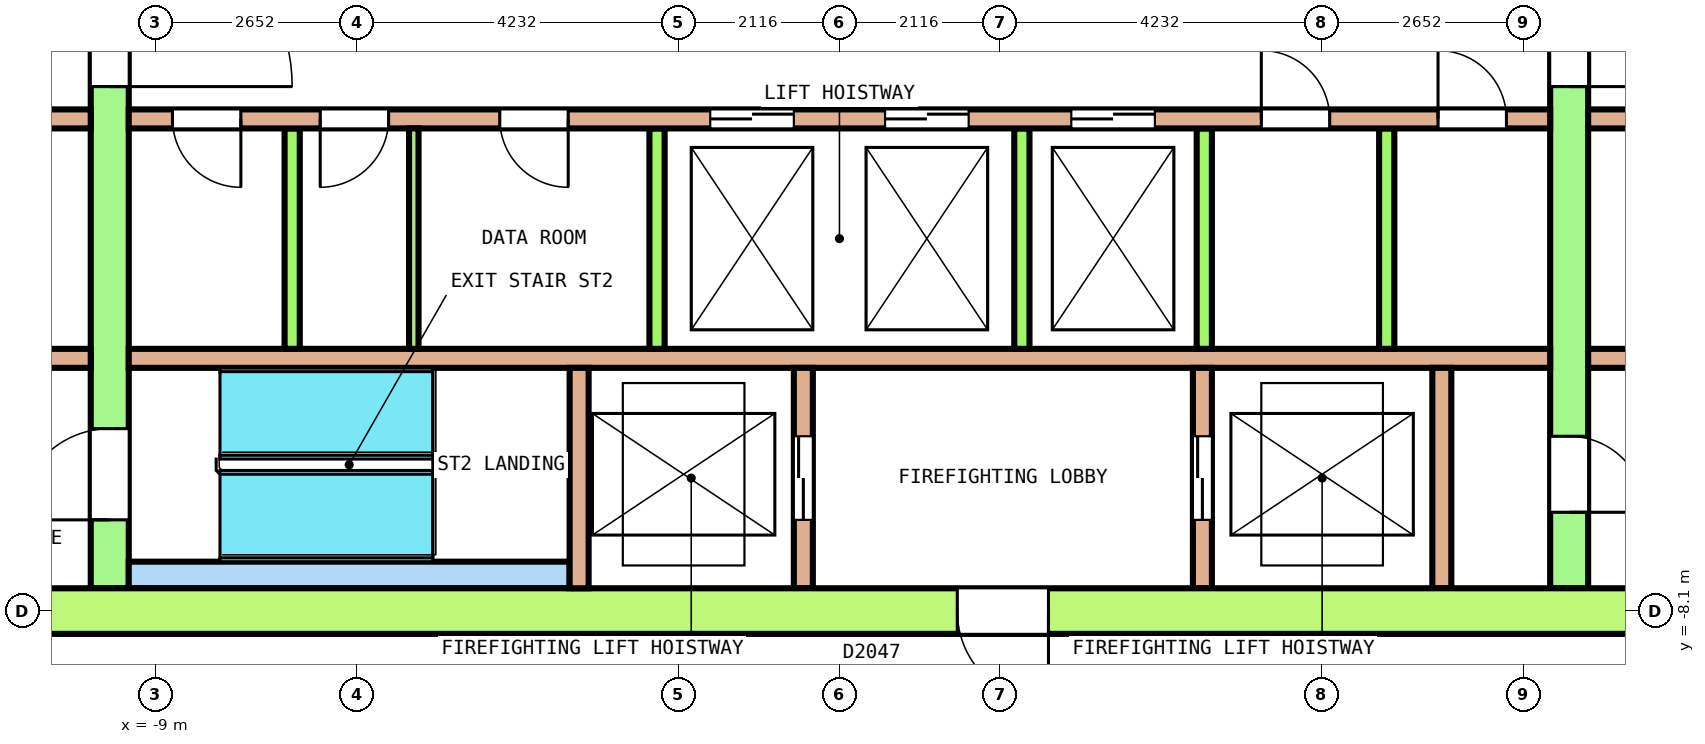
"""IFC4 building model, lengths in metres.
Left out: names, types, materials, properties, quantities, classifications, styles, units other than length and angle.
Written with IfcOpenShell. Run it as: python <this file> out.ifc"""

import sys

from ifc_helpers import new_model, si_unit, direction, frame, frame_2d, origin, place, context, subcontext, project, spatial, rectangle, extrude, element, fill, save


model = new_model("IFC4")
c1 = context("Model", 3, precision=1e-05, world=origin(), true_north=direction((0.0, 1.0)))
c2 = subcontext(c1, "Body", "Model", "MODEL_VIEW")
j1 = project(units=[si_unit("LENGTHUNIT", "METRE"), si_unit("PLANEANGLEUNIT", "RADIAN")], contexts=[c1])
p1 = place(None, origin())
s1 = spatial("IfcSite", under=j1, at=p1, CompositionType="ELEMENT")
p2 = place(p1, origin())
s2 = spatial("IfcBuilding", under=s1, at=p2, CompositionType="ELEMENT")
p3 = place(p2, frame((0.0, 0.0, 245.4)))
s3 = spatial("IfcBuildingStorey", under=s2, at=p3, CompositionType="ELEMENT", Elevation=245.4)
p4 = place(p3, frame((-13.5, -8.1, 0.0), z_axis=(0.0, 0.0, 1.0), x_axis=(1.0, 0.0, 0.0)))
e1 = element("IfcWall", 1, at=p4, inside=s3, PredefinedType="SHEAR", context=c2, shape_type="SweptSolid", body=[
    extrude(rectangle(XDim=27.0, YDim=0.6, at=frame_2d((13.5, 0.0))), origin(), (0.0, 0.0, 1.0), 3.7),
])
p5 = place(p4, frame((15.05, 0.0, 0.0)))
e2 = element("IfcOpeningElement", 2, at=p5, cuts=e1, PredefinedType="OPENING", context=c2, shape_type="SweptSolid", body=[
    extrude(rectangle(XDim=1.2, YDim=2.1, at=frame_2d((0.6, 1.05))), frame((0.0, 0.31, 0.0), z_axis=(0.0, -1.0, 0.0), x_axis=(1.0, 0.0, 0.0)), (0.0, 0.0, 1.0), 0.62),
])
p6 = place(p3, frame((-9.6, -7.8, 0.0), z_axis=(0.0, 0.0, 1.0), x_axis=(0.0, 1.0, 0.0)))
e3 = element("IfcWall", 3, at=p6, inside=s3, PredefinedType="SHEAR", context=c2, shape_type="SweptSolid", body=[
    extrude(rectangle(XDim=15.6, YDim=0.5, at=frame_2d((7.8, 0.0))), origin(), (0.0, 0.0, 1.0), 3.7),
])
p7 = place(p6, frame((6.6, 0.0, 0.0)))
e4 = element("IfcOpeningElement", 4, at=p7, cuts=e3, PredefinedType="OPENING", context=c2, shape_type="SweptSolid", body=[
    extrude(rectangle(XDim=2.4, YDim=2.1, at=frame_2d((1.2, 1.05))), frame((0.0, 0.26, 0.0), z_axis=(0.0, -1.0, 0.0), x_axis=(1.0, 0.0, 0.0)), (0.0, 0.0, 1.0), 0.52),
])
p8 = place(p6, frame((13.5, 0.0, 0.0)))
e5 = element("IfcOpeningElement", 5, at=p8, cuts=e3, PredefinedType="OPENING", context=c2, shape_type="SweptSolid", body=[
    extrude(rectangle(XDim=1.2, YDim=2.1, at=frame_2d((0.6, 1.05))), frame((0.0, 0.26, 0.0), z_axis=(0.0, -1.0, 0.0), x_axis=(1.0, 0.0, 0.0)), (0.0, 0.0, 1.0), 0.52),
])
p9 = place(p6, frame((0.9, 0.0, 0.0)))
e6 = element("IfcOpeningElement", 6, at=p9, cuts=e3, PredefinedType="OPENING", context=c2, shape_type="SweptSolid", body=[
    extrude(rectangle(XDim=1.2, YDim=2.1, at=frame_2d((0.6, 1.05))), frame((0.0, 0.26, 0.0), z_axis=(0.0, -1.0, 0.0), x_axis=(1.0, 0.0, 0.0)), (0.0, 0.0, 1.0), 0.52),
])
p10 = place(p3, frame((9.6, -7.8, 0.0), z_axis=(0.0, 0.0, 1.0), x_axis=(0.0, 1.0, 0.0)))
e7 = element("IfcWall", 7, at=p10, inside=s3, PredefinedType="SHEAR", context=c2, shape_type="SweptSolid", body=[
    extrude(rectangle(XDim=15.6, YDim=0.5, at=frame_2d((7.8, 0.0))), origin(), (0.0, 0.0, 1.0), 3.7),
])
p11 = place(p10, frame((6.6, 0.0, 0.0)))
e8 = element("IfcOpeningElement", 8, at=p11, cuts=e7, PredefinedType="OPENING", context=c2, shape_type="SweptSolid", body=[
    extrude(rectangle(XDim=2.4, YDim=2.1, at=frame_2d((1.2, 1.05))), frame((0.0, 0.26, 0.0), z_axis=(0.0, -1.0, 0.0), x_axis=(1.0, 0.0, 0.0)), (0.0, 0.0, 1.0), 0.52),
])
p12 = place(p10, frame((13.5, 0.0, 0.0)))
e9 = element("IfcOpeningElement", 9, at=p12, cuts=e7, PredefinedType="OPENING", context=c2, shape_type="SweptSolid", body=[
    extrude(rectangle(XDim=1.2, YDim=2.1, at=frame_2d((0.6, 1.05))), frame((0.0, 0.26, 0.0), z_axis=(0.0, -1.0, 0.0), x_axis=(1.0, 0.0, 0.0)), (0.0, 0.0, 1.0), 0.52),
])
p13 = place(p10, frame((1.0, 0.0, 0.0)))
e10 = element("IfcOpeningElement", 10, at=p13, cuts=e7, PredefinedType="OPENING", context=c2, shape_type="SweptSolid", body=[
    extrude(rectangle(XDim=1.0, YDim=2.1, at=frame_2d((0.5, 1.05))), frame((0.0, 0.26, 0.0), z_axis=(0.0, -1.0, 0.0), x_axis=(1.0, 0.0, 0.0)), (0.0, 0.0, 1.0), 0.52),
])
p14 = place(p3, frame((-12.9, -1.625, 0.0), z_axis=(0.0, 0.0, 1.0), x_axis=(1.0, 0.0, 0.0)))
e11 = element("IfcWall", 11, at=p14, inside=s3, PredefinedType="SOLIDWALL", context=c2, shape_type="SweptSolid", body=[
    extrude(rectangle(XDim=3.05, YDim=0.25, at=frame_2d((1.525, 0.0))), origin(), (0.0, 0.0, 1.0), 3.7),
])
p15 = place(p14, frame((1.075, 0.0, 0.0)))
e12 = element("IfcOpeningElement", 12, at=p15, cuts=e11, PredefinedType="OPENING", context=c2, shape_type="SweptSolid", body=[
    extrude(rectangle(XDim=0.9, YDim=2.1, at=frame_2d((0.45, 1.05))), frame((0.0, 0.135, 0.0), z_axis=(0.0, -1.0, 0.0), x_axis=(1.0, 0.0, 0.0)), (0.0, 0.0, 1.0), 0.27),
])
p16 = place(p3, frame((-9.35, -1.625, 0.0), z_axis=(0.0, 0.0, 1.0), x_axis=(1.0, 0.0, 0.0)))
e13 = element("IfcWall", 13, at=p16, inside=s3, PredefinedType="SOLIDWALL", context=c2, shape_type="SweptSolid", body=[
    extrude(rectangle(XDim=18.7, YDim=0.25, at=frame_2d((9.35, 0.0))), origin(), (0.0, 0.0, 1.0), 3.7),
])
p17 = place(p16, frame((7.65, 0.0, 0.0)))
e14 = element("IfcOpeningElement", 14, at=p17, cuts=e13, PredefinedType="OPENING", context=c2, shape_type="SweptSolid", body=[
    extrude(rectangle(XDim=1.1, YDim=2.1, at=frame_2d((0.55, 1.05))), frame((0.0, 0.135, 0.0), z_axis=(0.0, -1.0, 0.0), x_axis=(1.0, 0.0, 0.0)), (0.0, 0.0, 1.0), 0.27),
])
p18 = place(p16, frame((9.95, 0.0, 0.0)))
e15 = element("IfcOpeningElement", 15, at=p18, cuts=e13, PredefinedType="OPENING", context=c2, shape_type="SweptSolid", body=[
    extrude(rectangle(XDim=1.1, YDim=2.1, at=frame_2d((0.55, 1.05))), frame((0.0, 0.135, 0.0), z_axis=(0.0, -1.0, 0.0), x_axis=(1.0, 0.0, 0.0)), (0.0, 0.0, 1.0), 0.27),
])
p19 = place(p16, frame((12.4, 0.0, 0.0)))
e16 = element("IfcOpeningElement", 16, at=p19, cuts=e13, PredefinedType="OPENING", context=c2, shape_type="SweptSolid", body=[
    extrude(rectangle(XDim=1.1, YDim=2.1, at=frame_2d((0.55, 1.05))), frame((0.0, 0.135, 0.0), z_axis=(0.0, -1.0, 0.0), x_axis=(1.0, 0.0, 0.0)), (0.0, 0.0, 1.0), 0.27),
])
p20 = place(p16, frame((0.575, 0.0, 0.0)))
e17 = element("IfcOpeningElement", 17, at=p20, cuts=e13, PredefinedType="OPENING", context=c2, shape_type="SweptSolid", body=[
    extrude(rectangle(XDim=0.9, YDim=2.1, at=frame_2d((0.45, 1.05))), frame((0.0, 0.135, 0.0), z_axis=(0.0, -1.0, 0.0), x_axis=(1.0, 0.0, 0.0)), (0.0, 0.0, 1.0), 0.27),
])
p21 = place(p16, frame((2.519, 0.0, 0.0)))
e18 = element("IfcOpeningElement", 18, at=p21, cuts=e13, PredefinedType="OPENING", context=c2, shape_type="SweptSolid", body=[
    extrude(rectangle(XDim=0.9, YDim=2.1, at=frame_2d((0.45, 1.05))), frame((0.0, 0.135, 0.0), z_axis=(0.0, -1.0, 0.0), x_axis=(1.0, 0.0, 0.0)), (0.0, 0.0, 1.0), 0.27),
])
p22 = place(p16, frame((4.881, 0.0, 0.0)))
e19 = element("IfcOpeningElement", 19, at=p22, cuts=e13, PredefinedType="OPENING", context=c2, shape_type="SweptSolid", body=[
    extrude(rectangle(XDim=0.9, YDim=2.1, at=frame_2d((0.45, 1.05))), frame((0.0, 0.135, 0.0), z_axis=(0.0, -1.0, 0.0), x_axis=(1.0, 0.0, 0.0)), (0.0, 0.0, 1.0), 0.27),
])
p23 = place(p16, frame((14.9, 0.0, 0.0)))
e20 = element("IfcOpeningElement", 20, at=p23, cuts=e13, PredefinedType="OPENING", context=c2, shape_type="SweptSolid", body=[
    extrude(rectangle(XDim=0.9, YDim=2.1, at=frame_2d((0.45, 1.05))), frame((0.0, 0.135, 0.0), z_axis=(0.0, -1.0, 0.0), x_axis=(1.0, 0.0, 0.0)), (0.0, 0.0, 1.0), 0.27),
])
p24 = place(p16, frame((17.225, 0.0, 0.0)))
e21 = element("IfcOpeningElement", 21, at=p24, cuts=e13, PredefinedType="OPENING", context=c2, shape_type="SweptSolid", body=[
    extrude(rectangle(XDim=0.9, YDim=2.1, at=frame_2d((0.45, 1.05))), frame((0.0, 0.135, 0.0), z_axis=(0.0, -1.0, 0.0), x_axis=(1.0, 0.0, 0.0)), (0.0, 0.0, 1.0), 0.27),
])
p25 = place(p3, frame((9.85, -1.625, 0.0), z_axis=(0.0, 0.0, 1.0), x_axis=(1.0, 0.0, 0.0)))
e22 = element("IfcWall", 22, at=p25, inside=s3, PredefinedType="SOLIDWALL", context=c2, shape_type="SweptSolid", body=[
    extrude(rectangle(XDim=3.05, YDim=0.25, at=frame_2d((1.525, 0.0))), origin(), (0.0, 0.0, 1.0), 3.7),
])
p26 = place(p25, frame((1.075, 0.0, 0.0)))
e23 = element("IfcOpeningElement", 23, at=p26, cuts=e22, PredefinedType="OPENING", context=c2, shape_type="SweptSolid", body=[
    extrude(rectangle(XDim=0.9, YDim=2.1, at=frame_2d((0.45, 1.05))), frame((0.0, 0.135, 0.0), z_axis=(0.0, -1.0, 0.0), x_axis=(1.0, 0.0, 0.0)), (0.0, 0.0, 1.0), 0.27),
])
p27 = place(p3, frame((-12.9, -4.775, 0.0), z_axis=(0.0, 0.0, 1.0), x_axis=(1.0, 0.0, 0.0)))
e24 = element("IfcWall", 24, at=p27, inside=s3, PredefinedType="SOLIDWALL", context=c2, shape_type="SweptSolid", body=[
    extrude(rectangle(XDim=3.05, YDim=0.25, at=frame_2d((1.525, 0.0))), origin(), (0.0, 0.0, 1.0), 3.7),
])
p28 = place(p3, frame((-9.35, -4.775, 0.0), z_axis=(0.0, 0.0, 1.0), x_axis=(1.0, 0.0, 0.0)))
e25 = element("IfcWall", 25, at=p28, inside=s3, PredefinedType="SOLIDWALL", context=c2, shape_type="SweptSolid", body=[
    extrude(rectangle(XDim=18.7, YDim=0.25, at=frame_2d((9.35, 0.0))), origin(), (0.0, 0.0, 1.0), 3.7),
])
p29 = place(p3, frame((9.85, -4.775, 0.0), z_axis=(0.0, 0.0, 1.0), x_axis=(1.0, 0.0, 0.0)))
e26 = element("IfcWall", 26, at=p29, inside=s3, PredefinedType="SOLIDWALL", context=c2, shape_type="SweptSolid", body=[
    extrude(rectangle(XDim=3.05, YDim=0.25, at=frame_2d((1.525, 0.0))), origin(), (0.0, 0.0, 1.0), 3.7),
])
for number, where, z_axis, x_axis in (
    (27, (-7.2, -4.65, 0.0), (0.0, 0.0, 1.0), (0.0, 1.0, 0.0)),
    (28, (-2.4, -4.65, 0.0), (0.0, 0.0, 1.0), (0.0, 1.0, 0.0)),
    (29, (2.4, -4.65, 0.0), (0.0, 0.0, 1.0), (0.0, 1.0, 0.0)),
    (30, (4.8, -4.65, 0.0), (0.0, 0.0, 1.0), (0.0, 1.0, 0.0)),
    (31, (7.2, -4.65, 0.0), (0.0, 0.0, 1.0), (0.0, 1.0, 0.0)),
):
    element("IfcWall", number, at=place(p3, frame(where, z_axis=z_axis, x_axis=x_axis)), inside=s3, PredefinedType="SOLIDWALL", context=c2, shape_type="SweptSolid", body=[
        extrude(rectangle(XDim=2.9, YDim=0.2, at=frame_2d((1.45, 0.0))), origin(), (0.0, 0.0, 1.0), 3.7),
    ])
p30 = place(p3, frame((-9.35, -7.625, 0.0), z_axis=(0.0, 0.0, 1.0), x_axis=(1.0, 0.0, 0.0)))
e32 = element("IfcWall", 32, at=p30, inside=s3, PredefinedType="SOLIDWALL", context=c2, shape_type="SweptSolid", body=[
    extrude(rectangle(XDim=5.8, YDim=0.35, at=frame_2d((2.9, 0.0))), origin(), (0.0, 0.0, 1.0), 3.7),
])
p31 = place(p3, frame((-3.425, -7.8, 0.0), z_axis=(0.0, 0.0, 1.0), x_axis=(0.0, 1.0, 0.0)))
e33 = element("IfcWall", 33, at=p31, inside=s3, PredefinedType="SOLIDWALL", context=c2, shape_type="SweptSolid", body=[
    extrude(rectangle(XDim=2.9, YDim=0.25, at=frame_2d((1.45, 0.0))), origin(), (0.0, 0.0, 1.0), 3.7),
])
p32 = place(p3, frame((-0.475, -7.8, 0.0), z_axis=(0.0, 0.0, 1.0), x_axis=(0.0, 1.0, 0.0)))
e34 = element("IfcWall", 34, at=p32, inside=s3, PredefinedType="SOLIDWALL", context=c2, shape_type="SweptSolid", body=[
    extrude(rectangle(XDim=2.9, YDim=0.25, at=frame_2d((1.45, 0.0))), origin(), (0.0, 0.0, 1.0), 3.7),
])
p33 = place(p32, frame((0.9, 0.0, 0.0)))
e35 = element("IfcOpeningElement", 35, at=p33, cuts=e34, PredefinedType="OPENING", context=c2, shape_type="SweptSolid", body=[
    extrude(rectangle(XDim=1.1, YDim=2.1, at=frame_2d((0.55, 1.05))), frame((0.0, 0.135, 0.0), z_axis=(0.0, -1.0, 0.0), x_axis=(1.0, 0.0, 0.0)), (0.0, 0.0, 1.0), 0.27),
])
p34 = place(p3, frame((4.775, -7.8, 0.0), z_axis=(0.0, 0.0, 1.0), x_axis=(0.0, 1.0, 0.0)))
e36 = element("IfcWall", 36, at=p34, inside=s3, PredefinedType="SOLIDWALL", context=c2, shape_type="SweptSolid", body=[
    extrude(rectangle(XDim=2.9, YDim=0.25, at=frame_2d((1.45, 0.0))), origin(), (0.0, 0.0, 1.0), 3.7),
])
p35 = place(p34, frame((0.9, 0.0, 0.0)))
e37 = element("IfcOpeningElement", 37, at=p35, cuts=e36, PredefinedType="OPENING", context=c2, shape_type="SweptSolid", body=[
    extrude(rectangle(XDim=1.1, YDim=2.1, at=frame_2d((0.55, 1.05))), frame((0.0, 0.135, 0.0), z_axis=(0.0, -1.0, 0.0), x_axis=(1.0, 0.0, 0.0)), (0.0, 0.0, 1.0), 0.27),
])
p36 = place(p3, frame((7.925, -7.8, 0.0), z_axis=(0.0, 0.0, 1.0), x_axis=(0.0, 1.0, 0.0)))
e38 = element("IfcWall", 38, at=p36, inside=s3, PredefinedType="SOLIDWALL", context=c2, shape_type="SweptSolid", body=[
    extrude(rectangle(XDim=2.9, YDim=0.25, at=frame_2d((1.45, 0.0))), origin(), (0.0, 0.0, 1.0), 3.7),
])
p37 = place(p3, frame((-5.6, -4.65, 0.0), z_axis=(0.0, 0.0, 1.0), x_axis=(0.0, 1.0, 0.0)))
e39 = element("IfcWall", 39, at=p37, inside=s3, PredefinedType="PARTITIONING", context=c2, shape_type="SweptSolid", body=[
    extrude(rectangle(XDim=2.9, YDim=0.125, at=frame_2d((1.45, 0.0))), origin(), (0.0, 0.0, 1.0), 3.7),
])
p38 = place(p17, origin())
e40 = element("IfcDoor", 40, at=p38, inside=s3, OperationType="DOUBLE_DOOR_SLIDING", PredefinedType="DOOR", context=c2, shape_type="SweptSolid", body=[
    extrude(rectangle(XDim=1.1, YDim=2.1, at=frame_2d((0.55, 1.05))), frame((0.0, 0.075, 0.0), z_axis=(0.0, -1.0, 0.0), x_axis=(1.0, 0.0, 0.0)), (0.0, 0.0, 1.0), 0.15),
])
fill(e14, e40)
p39 = place(p18, origin())
e41 = element("IfcDoor", 41, at=p39, inside=s3, OperationType="DOUBLE_DOOR_SLIDING", PredefinedType="DOOR", context=c2, shape_type="SweptSolid", body=[
    extrude(rectangle(XDim=1.1, YDim=2.1, at=frame_2d((0.55, 1.05))), frame((0.0, 0.075, 0.0), z_axis=(0.0, -1.0, 0.0), x_axis=(1.0, 0.0, 0.0)), (0.0, 0.0, 1.0), 0.15),
])
fill(e15, e41)
p40 = place(p19, origin())
e42 = element("IfcDoor", 42, at=p40, inside=s3, OperationType="DOUBLE_DOOR_SLIDING", PredefinedType="DOOR", context=c2, shape_type="SweptSolid", body=[
    extrude(rectangle(XDim=1.1, YDim=2.1, at=frame_2d((0.55, 1.05))), frame((0.0, 0.075, 0.0), z_axis=(0.0, -1.0, 0.0), x_axis=(1.0, 0.0, 0.0)), (0.0, 0.0, 1.0), 0.15),
])
fill(e16, e42)
p41 = place(p33, origin())
e43 = element("IfcDoor", 43, at=p41, inside=s3, OperationType="DOUBLE_DOOR_SLIDING", PredefinedType="DOOR", context=c2, shape_type="SweptSolid", body=[
    extrude(rectangle(XDim=1.1, YDim=2.1, at=frame_2d((0.55, 1.05))), frame((0.0, 0.075, 0.0), z_axis=(0.0, -1.0, 0.0), x_axis=(1.0, 0.0, 0.0)), (0.0, 0.0, 1.0), 0.15),
])
fill(e35, e43)
p42 = place(p35, origin())
e44 = element("IfcDoor", 44, at=p42, inside=s3, OperationType="DOUBLE_DOOR_SLIDING", PredefinedType="DOOR", context=c2, shape_type="SweptSolid", body=[
    extrude(rectangle(XDim=1.1, YDim=2.1, at=frame_2d((0.55, 1.05))), frame((0.0, 0.075, 0.0), z_axis=(0.0, -1.0, 0.0), x_axis=(1.0, 0.0, 0.0)), (0.0, 0.0, 1.0), 0.15),
])
fill(e37, e44)
p43 = place(p7, origin())
e45 = element("IfcDoor", 45, at=p43, inside=s3, OperationType="DOUBLE_DOOR_SINGLE_SWING", PredefinedType="DOOR", context=c2, shape_type="SweptSolid", body=[
    extrude(rectangle(XDim=2.4, YDim=2.1, at=frame_2d((1.2, 1.05))), frame((0.0, 0.2, 0.0), z_axis=(0.0, -1.0, 0.0), x_axis=(1.0, 0.0, 0.0)), (0.0, 0.0, 1.0), 0.4),
])
fill(e4, e45)
p44 = place(p11, origin())
e46 = element("IfcDoor", 46, at=p44, inside=s3, OperationType="DOUBLE_DOOR_SINGLE_SWING", PredefinedType="DOOR", context=c2, shape_type="SweptSolid", body=[
    extrude(rectangle(XDim=2.4, YDim=2.1, at=frame_2d((1.2, 1.05))), frame((0.0, 0.2, 0.0), z_axis=(0.0, -1.0, 0.0), x_axis=(1.0, 0.0, 0.0)), (0.0, 0.0, 1.0), 0.4),
])
fill(e8, e46)
p45 = place(p9, origin())
e47 = element("IfcDoor", 47, at=p45, inside=s3, OperationType="SINGLE_SWING_RIGHT", PredefinedType="DOOR", context=c2, shape_type="SweptSolid", body=[
    extrude(rectangle(XDim=1.2, YDim=2.1, at=frame_2d((0.6, 1.05))), frame((0.0, 0.2, 0.0), z_axis=(0.0, -1.0, 0.0), x_axis=(1.0, 0.0, 0.0)), (0.0, 0.0, 1.0), 0.4),
])
fill(e6, e47)
p46 = place(p5, origin())
e48 = element("IfcDoor", 48, at=p46, inside=s3, OperationType="SINGLE_SWING_RIGHT", PredefinedType="DOOR", context=c2, shape_type="SweptSolid", body=[
    extrude(rectangle(XDim=1.2, YDim=2.1, at=frame_2d((0.6, 1.05))), frame((0.0, 0.25, 0.0), z_axis=(0.0, -1.0, 0.0), x_axis=(1.0, 0.0, 0.0)), (0.0, 0.0, 1.0), 0.5),
])
fill(e2, e48)
p47 = place(p13, origin())
e49 = element("IfcDoor", 49, at=p47, inside=s3, OperationType="SINGLE_SWING_RIGHT", PredefinedType="DOOR", context=c2, shape_type="SweptSolid", body=[
    extrude(rectangle(XDim=1.0, YDim=2.1, at=frame_2d((0.5, 1.05))), frame((0.0, 0.2, 0.0), z_axis=(0.0, -1.0, 0.0), x_axis=(1.0, 0.0, 0.0)), (0.0, 0.0, 1.0), 0.4),
])
fill(e10, e49)
p48 = place(p20, origin())
e50 = element("IfcDoor", 50, at=p48, inside=s3, OperationType="SINGLE_SWING_RIGHT", PredefinedType="DOOR", context=c2, shape_type="SweptSolid", body=[
    extrude(rectangle(XDim=0.9, YDim=2.1, at=frame_2d((0.45, 1.05))), frame((0.0, 0.075, 0.0), z_axis=(0.0, -1.0, 0.0), x_axis=(1.0, 0.0, 0.0)), (0.0, 0.0, 1.0), 0.15),
])
fill(e17, e50)
p49 = place(p21, origin())
e51 = element("IfcDoor", 51, at=p49, inside=s3, OperationType="SINGLE_SWING_LEFT", PredefinedType="DOOR", context=c2, shape_type="SweptSolid", body=[
    extrude(rectangle(XDim=0.9, YDim=2.1, at=frame_2d((0.45, 1.05))), frame((0.0, 0.075, 0.0), z_axis=(0.0, -1.0, 0.0), x_axis=(1.0, 0.0, 0.0)), (0.0, 0.0, 1.0), 0.15),
])
fill(e18, e51)
p50 = place(p22, origin())
e52 = element("IfcDoor", 52, at=p50, inside=s3, OperationType="SINGLE_SWING_RIGHT", PredefinedType="DOOR", context=c2, shape_type="SweptSolid", body=[
    extrude(rectangle(XDim=0.9, YDim=2.1, at=frame_2d((0.45, 1.05))), frame((0.0, 0.075, 0.0), z_axis=(0.0, -1.0, 0.0), x_axis=(1.0, 0.0, 0.0)), (0.0, 0.0, 1.0), 0.15),
])
fill(e19, e52)
p51 = place(p23, origin())
e53 = element("IfcDoor", 53, at=p51, inside=s3, OperationType="SINGLE_SWING_LEFT", PredefinedType="DOOR", context=c2, shape_type="SweptSolid", body=[
    extrude(rectangle(XDim=0.9, YDim=2.1, at=frame_2d((0.45, 1.05))), frame((0.0, 0.075, 0.0), z_axis=(0.0, -1.0, 0.0), x_axis=(1.0, 0.0, 0.0)), (0.0, 0.0, 1.0), 0.15),
])
fill(e20, e53)
p52 = place(p24, origin())
e54 = element("IfcDoor", 54, at=p52, inside=s3, OperationType="SINGLE_SWING_RIGHT", PredefinedType="DOOR", context=c2, shape_type="SweptSolid", body=[
    extrude(rectangle(XDim=0.9, YDim=2.1, at=frame_2d((0.45, 1.05))), frame((0.0, 0.075, 0.0), z_axis=(0.0, -1.0, 0.0), x_axis=(1.0, 0.0, 0.0)), (0.0, 0.0, 1.0), 0.15),
])
fill(e21, e54)
save(model, sys.argv[1])
